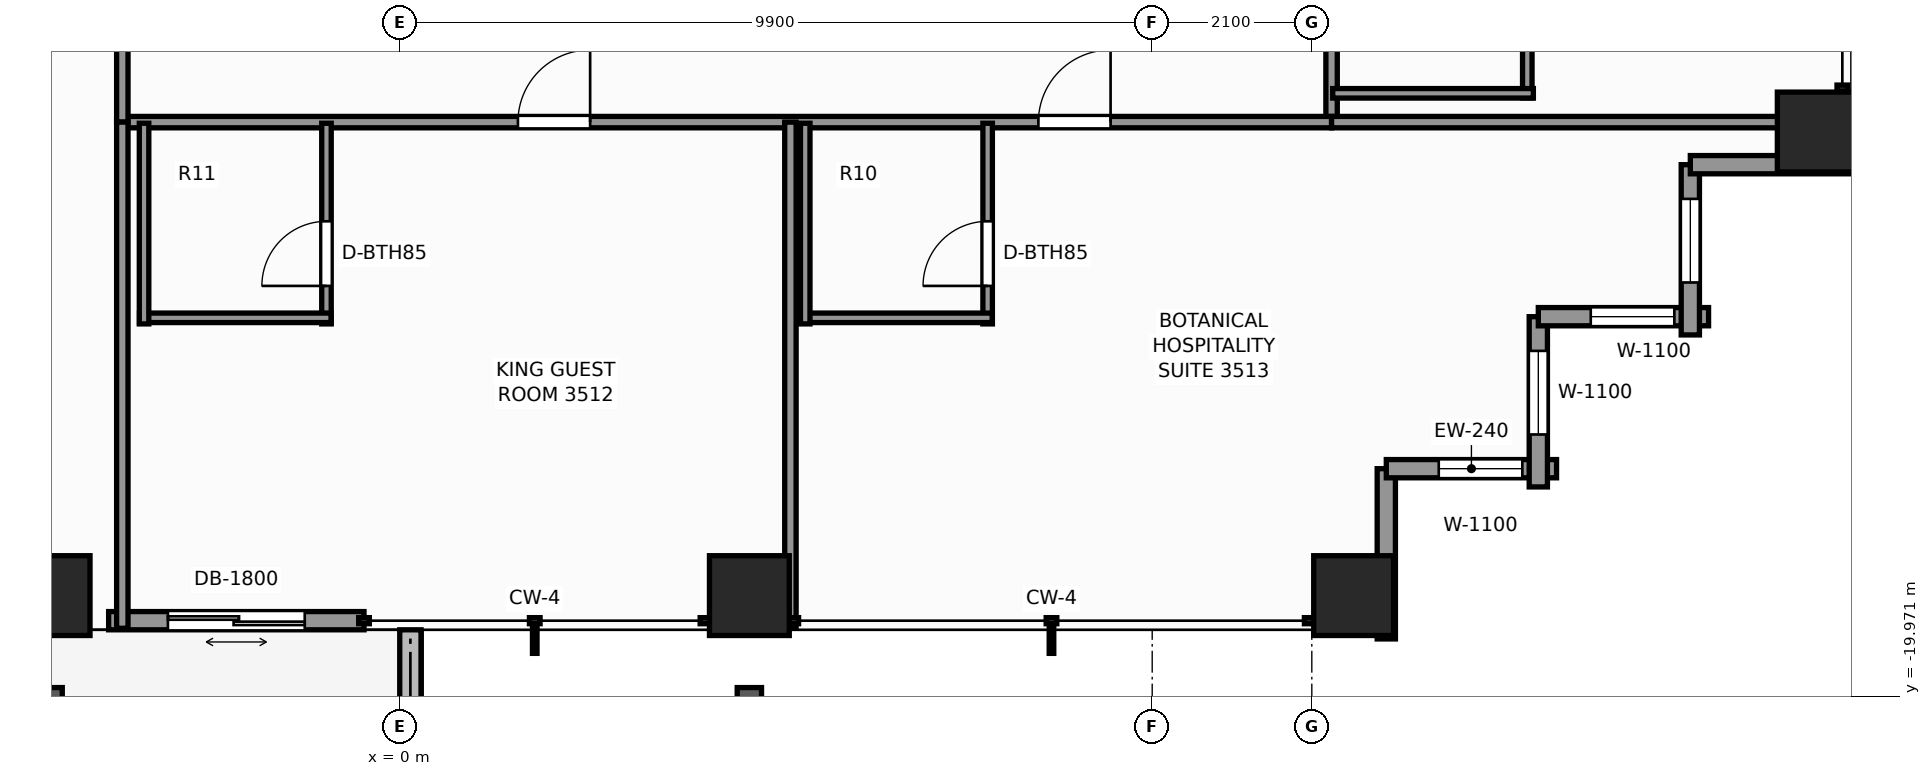
"""IFC4 building model, lengths in metres.
Left out: names, types, materials, properties, quantities, classifications, styles, units other than length and angle.
Written with IfcOpenShell. Run it as: python <this file> out.ifc"""

import sys

from ifc_helpers import new_model, si_unit, direction, frame, frame_2d, origin, origin_2d, place, context, subcontext, project, spatial, rectangle, extrude, element, fill, save


model = new_model("IFC4")
c1 = context("Model", 3, precision=1e-05, world=origin(), true_north=direction((0.0, 1.0)))
c2 = subcontext(c1, "Body", "Model", "MODEL_VIEW")
j1 = project(units=[si_unit("LENGTHUNIT", "METRE"), si_unit("PLANEANGLEUNIT", "RADIAN")], contexts=[c1])
p1 = place(None, origin())
s1 = spatial("IfcSite", under=j1, at=p1, CompositionType="ELEMENT")
p2 = place(p1, origin())
s2 = spatial("IfcBuilding", under=s1, at=p2, CompositionType="ELEMENT")
p3 = place(p2, frame((0.0, 0.0, 121.7)))
s3 = spatial("IfcBuildingStorey", under=s2, at=p3, CompositionType="ELEMENT", Elevation=121.7)
for number, where, z_axis, x_axis in (
    (1, (-4.6, -18.65, 0.0), (0.0, 0.0, 1.0), (1.0, 0.0, 0.0)),
    (2, (4.6, -18.65, 0.0), (0.0, 0.0, 1.0), (1.0, 0.0, 0.0)),
    (3, (12.55, -18.65, 0.0), (0.0, 0.0, 1.0), (1.0, 0.0, 0.0)),
    (4, (18.65, -12.55, 0.0), (0.0, 0.0, 1.0), (1.0, 0.0, 0.0)),
):
    element("IfcColumn", number, at=place(p3, frame(where, z_axis=z_axis, x_axis=x_axis)), inside=s3, PredefinedType="COLUMN", context=c2, shape_type="SweptSolid", body=[
        extrude(rectangle(XDim=1.05, YDim=1.05, at=origin_2d()), origin(), (0.0, 0.0, 1.0), 3.3),
    ])
p4 = place(p3, frame((0.14, -22.4, -0.04), z_axis=(0.0, 0.0, 1.0), x_axis=(0.0, 1.0, 0.0)))
e5 = element("IfcWall", 5, at=p4, inside=s3, PredefinedType="PARAPET", context=c2, shape_type="SweptSolid", body=[
    extrude(rectangle(XDim=3.3, YDim=0.28, at=frame_2d((1.65, 0.0))), origin(), (0.0, 0.0, 1.0), 0.42),
])
p5 = place(p3, frame((-0.47, -18.98, 0.0), z_axis=(0.0, 0.0, 1.0), x_axis=(-1.0, 0.0, 0.0)))
e6 = element("IfcWall", 6, at=p5, inside=s3, PredefinedType="STANDARD", context=c2, shape_type="SweptSolid", body=[
    extrude(rectangle(XDim=3.36, YDim=0.24, at=frame_2d((1.68, 0.0))), origin(), (0.0, 0.0, 1.0), 3.08),
])
p6 = place(p5, frame((0.78, 0.0, 0.0)))
e7 = element("IfcOpeningElement", 7, at=p6, cuts=e6, PredefinedType="OPENING", context=c2, shape_type="SweptSolid", body=[
    extrude(rectangle(XDim=1.8, YDim=2.2, at=frame_2d((0.9, 1.1))), frame((0.0, 0.13, 0.0), z_axis=(0.0, -1.0, 0.0), x_axis=(1.0, 0.0, 0.0)), (0.0, 0.0, 1.0), 0.26),
])
p7 = place(p3, frame((12.98, -16.98, 0.0), z_axis=(0.0, 0.0, 1.0), x_axis=(0.0, -1.0, 0.0)))
e8 = element("IfcWall", 8, at=p7, inside=s3, PredefinedType="STANDARD", context=c2, shape_type="SweptSolid", body=[
    extrude(rectangle(XDim=2.24, YDim=0.24, at=frame_2d((1.12, 0.0))), origin(), (0.0, 0.0, 1.0), 2.459),
])
p8 = place(p3, frame((15.22, -16.98, 0.0), z_axis=(0.0, 0.0, 1.0), x_axis=(-1.0, 0.0, 0.0)))
e9 = element("IfcWall", 9, at=p8, inside=s3, PredefinedType="STANDARD", context=c2, shape_type="SweptSolid", body=[
    extrude(rectangle(XDim=2.24, YDim=0.24, at=frame_2d((1.12, 0.0))), origin(), (0.0, 0.0, 1.0), 2.459),
])
p9 = place(p8, frame((0.45, 0.0, 0.65)))
e10 = element("IfcOpeningElement", 10, at=p9, cuts=e9, PredefinedType="OPENING", context=c2, shape_type="SweptSolid", body=[
    extrude(rectangle(XDim=1.1, YDim=1.45, at=frame_2d((0.55, 0.725))), frame((0.0, 0.13, 0.0), z_axis=(0.0, -1.0, 0.0), x_axis=(1.0, 0.0, 0.0)), (0.0, 0.0, 1.0), 0.26),
])
p10 = place(p3, frame((14.98, -14.98, 0.0), z_axis=(0.0, 0.0, 1.0), x_axis=(0.0, -1.0, 0.0)))
e11 = element("IfcWall", 11, at=p10, inside=s3, PredefinedType="STANDARD", context=c2, shape_type="SweptSolid", body=[
    extrude(rectangle(XDim=2.24, YDim=0.24, at=frame_2d((1.12, 0.0))), origin(), (0.0, 0.0, 1.0), 2.459),
])
p11 = place(p10, frame((0.45, 0.0, 0.65)))
e12 = element("IfcOpeningElement", 12, at=p11, cuts=e11, PredefinedType="OPENING", context=c2, shape_type="SweptSolid", body=[
    extrude(rectangle(XDim=1.1, YDim=1.45, at=frame_2d((0.55, 0.725))), frame((0.0, 0.13, 0.0), z_axis=(0.0, -1.0, 0.0), x_axis=(1.0, 0.0, 0.0)), (0.0, 0.0, 1.0), 0.26),
])
p12 = place(p3, frame((17.22, -14.98, 0.0), z_axis=(0.0, 0.0, 1.0), x_axis=(-1.0, 0.0, 0.0)))
e13 = element("IfcWall", 13, at=p12, inside=s3, PredefinedType="STANDARD", context=c2, shape_type="SweptSolid", body=[
    extrude(rectangle(XDim=2.24, YDim=0.24, at=frame_2d((1.12, 0.0))), origin(), (0.0, 0.0, 1.0), 2.459),
])
p13 = place(p12, frame((0.45, 0.0, 0.65)))
e14 = element("IfcOpeningElement", 14, at=p13, cuts=e13, PredefinedType="OPENING", context=c2, shape_type="SweptSolid", body=[
    extrude(rectangle(XDim=1.1, YDim=1.45, at=frame_2d((0.55, 0.725))), frame((0.0, 0.13, 0.0), z_axis=(0.0, -1.0, 0.0), x_axis=(1.0, 0.0, 0.0)), (0.0, 0.0, 1.0), 0.26),
])
p14 = place(p3, frame((16.98, -12.98, 0.0), z_axis=(0.0, 0.0, 1.0), x_axis=(0.0, -1.0, 0.0)))
e15 = element("IfcWall", 15, at=p14, inside=s3, PredefinedType="STANDARD", context=c2, shape_type="SweptSolid", body=[
    extrude(rectangle(XDim=2.24, YDim=0.24, at=frame_2d((1.12, 0.0))), origin(), (0.0, 0.0, 1.0), 2.459),
])
p15 = place(p14, frame((0.45, 0.0, 0.65)))
e16 = element("IfcOpeningElement", 16, at=p15, cuts=e15, PredefinedType="OPENING", context=c2, shape_type="SweptSolid", body=[
    extrude(rectangle(XDim=1.1, YDim=1.45, at=frame_2d((0.55, 0.725))), frame((0.0, 0.13, 0.0), z_axis=(0.0, -1.0, 0.0), x_axis=(1.0, 0.0, 0.0)), (0.0, 0.0, 1.0), 0.26),
])
p16 = place(p3, frame((19.22, -12.98, 0.0), z_axis=(0.0, 0.0, 1.0), x_axis=(-1.0, 0.0, 0.0)))
e17 = element("IfcWall", 17, at=p16, inside=s3, PredefinedType="STANDARD", context=c2, shape_type="SweptSolid", body=[
    extrude(rectangle(XDim=2.24, YDim=0.24, at=frame_2d((1.12, 0.0))), origin(), (0.0, 0.0, 1.0), 2.459),
])
p17 = place(p3, frame((12.26, -12.42, 0.0), z_axis=(0.0, 0.0, 1.0), x_axis=(0.0, 1.0, 0.0)))
e18 = element("IfcWall", 18, at=p17, inside=s3, PredefinedType="PARTITIONING", context=c2, shape_type="SweptSolid", body=[
    extrude(rectangle(XDim=24.84, YDim=0.15, at=frame_2d((12.42, 0.0))), origin(), (0.0, 0.0, 1.0), 2.292),
])
p18 = place(p17, frame((4.224, 0.0, 0.0)))
e19 = element("IfcOpeningElement", 19, at=p18, cuts=e18, PredefinedType="OPENING", context=c2, shape_type="SweptSolid", body=[
    extrude(rectangle(XDim=0.95, YDim=2.06, at=frame_2d((0.475, 1.03))), frame((0.0, 0.085, 0.0), z_axis=(0.0, -1.0, 0.0), x_axis=(1.0, 0.0, 0.0)), (0.0, 0.0, 1.0), 0.17),
])
p19 = place(p17, frame((10.417, 0.0, 0.0)))
e20 = element("IfcOpeningElement", 20, at=p19, cuts=e18, PredefinedType="OPENING", context=c2, shape_type="SweptSolid", body=[
    extrude(rectangle(XDim=0.95, YDim=2.06, at=frame_2d((0.475, 1.03))), frame((0.0, 0.085, 0.0), z_axis=(0.0, -1.0, 0.0), x_axis=(1.0, 0.0, 0.0)), (0.0, 0.0, 1.0), 0.17),
])
p20 = place(p17, frame((18.556, 0.0, 0.0)))
e21 = element("IfcOpeningElement", 21, at=p20, cuts=e18, PredefinedType="OPENING", context=c2, shape_type="SweptSolid", body=[
    extrude(rectangle(XDim=0.95, YDim=2.06, at=frame_2d((0.475, 1.03))), frame((0.0, 0.085, 0.0), z_axis=(0.0, -1.0, 0.0), x_axis=(1.0, 0.0, 0.0)), (0.0, 0.0, 1.0), 0.17),
])
p21 = place(p17, frame((20.916, 0.0, 0.0)))
e22 = element("IfcOpeningElement", 22, at=p21, cuts=e18, PredefinedType="OPENING", context=c2, shape_type="SweptSolid", body=[
    extrude(rectangle(XDim=0.9, YDim=2.06, at=frame_2d((0.45, 1.03))), frame((0.0, 0.085, 0.0), z_axis=(0.0, -1.0, 0.0), x_axis=(1.0, 0.0, 0.0)), (0.0, 0.0, 1.0), 0.17),
])
p22 = place(p3, frame((-3.65, -12.42, 0.0), z_axis=(0.0, 0.0, 1.0), x_axis=(1.0, 0.0, 0.0)))
e23 = element("IfcWall", 23, at=p22, inside=s3, PredefinedType="PARTITIONING", context=c2, shape_type="SweptSolid", body=[
    extrude(rectangle(XDim=15.91, YDim=0.15, at=frame_2d((7.955, 0.0))), origin(), (0.0, 0.0, 1.0), 2.292),
])
p23 = place(p22, frame((5.205, 0.0, 0.0)))
e24 = element("IfcOpeningElement", 24, at=p23, cuts=e23, PredefinedType="OPENING", context=c2, shape_type="SweptSolid", body=[
    extrude(rectangle(XDim=0.95, YDim=2.06, at=frame_2d((0.475, 1.03))), frame((0.0, 0.085, 0.0), z_axis=(0.0, -1.0, 0.0), x_axis=(1.0, 0.0, 0.0)), (0.0, 0.0, 1.0), 0.17),
])
p24 = place(p22, frame((12.052, 0.0, 0.0)))
e25 = element("IfcOpeningElement", 25, at=p24, cuts=e23, PredefinedType="OPENING", context=c2, shape_type="SweptSolid", body=[
    extrude(rectangle(XDim=0.95, YDim=2.06, at=frame_2d((0.475, 1.03))), frame((0.0, 0.085, 0.0), z_axis=(0.0, -1.0, 0.0), x_axis=(1.0, 0.0, 0.0)), (0.0, 0.0, 1.0), 0.17),
])
p25 = place(p3, frame((-3.65, -12.42, 0.0), z_axis=(0.0, 0.0, 1.0), x_axis=(0.0, 1.0, 0.0)))
e26 = element("IfcWall", 26, at=p25, inside=s3, PredefinedType="PARTITIONING", context=c2, shape_type="SweptSolid", body=[
    extrude(rectangle(XDim=2.52, YDim=0.15, at=frame_2d((1.26, 0.0))), origin(), (0.0, 0.0, 1.0), 3.08),
])
p26 = place(p3, frame((12.26, -12.42, 0.0), z_axis=(0.0, 0.0, 1.0), x_axis=(1.0, 0.0, 0.0)))
e27 = element("IfcWall", 27, at=p26, inside=s3, PredefinedType="PARTITIONING", context=c2, shape_type="SweptSolid", body=[
    extrude(rectangle(XDim=6.82, YDim=0.15, at=frame_2d((3.41, 0.0))), origin(), (0.0, 0.0, 1.0), 2.292),
])
p27 = place(p3, frame((14.835, -12.101, 0.0), z_axis=(0.0, 0.0, 1.0), x_axis=(0.0, 1.0, 0.0)))
e28 = element("IfcWall", 28, at=p27, inside=s3, PredefinedType="PARTITIONING", context=c2, shape_type="SweptSolid", body=[
    extrude(rectangle(XDim=2.52, YDim=0.125, at=frame_2d((1.26, 0.0))), origin(), (0.0, 0.0, 1.0), 2.292),
])
p28 = place(p3, frame((12.275, -12.041, 0.0), z_axis=(0.0, 0.0, 1.0), x_axis=(1.0, 0.0, 0.0)))
e29 = element("IfcWall", 29, at=p28, inside=s3, PredefinedType="PARTITIONING", context=c2, shape_type="SweptSolid", body=[
    extrude(rectangle(XDim=2.64, YDim=0.125, at=frame_2d((1.32, 0.0))), origin(), (0.0, 0.0, 1.0), 3.08),
])
for number, where, z_axis, x_axis in (
    (30, (-3.65, -19.08, 0.0), (0.0, 0.0, 1.0), (0.0, 1.0, 0.0)),
    (31, (5.14, -19.08, 0.0), (0.0, 0.0, 1.0), (0.0, 1.0, 0.0)),
):
    element("IfcWall", number, at=place(p3, frame(where, z_axis=z_axis, x_axis=x_axis)), inside=s3, PredefinedType="PARTITIONING", context=c2, shape_type="SweptSolid", body=[
        extrude(rectangle(XDim=6.66, YDim=0.15, at=frame_2d((3.33, 0.0))), origin(), (0.0, 0.0, 1.0), 2.449),
    ])
p29 = place(p3, frame((-0.964, -15.075, 0.0), z_axis=(0.0, 0.0, 1.0), x_axis=(0.0, 1.0, 0.0)))
e32 = element("IfcWall", 32, at=p29, inside=s3, PredefinedType="PARTITIONING", context=c2, shape_type="SweptSolid", body=[
    extrude(rectangle(XDim=2.64, YDim=0.125, at=frame_2d((1.32, 0.0))), origin(), (0.0, 0.0, 1.0), 3.08),
])
p30 = place(p29, frame((0.5, 0.0, 0.0)))
e33 = element("IfcOpeningElement", 33, at=p30, cuts=e32, PredefinedType="OPENING", context=c2, shape_type="SweptSolid", body=[
    extrude(rectangle(XDim=0.85, YDim=2.03, at=frame_2d((0.425, 1.015))), frame((0.0, 0.073, 0.0), z_axis=(0.0, -1.0, 0.0), x_axis=(1.0, 0.0, 0.0)), (0.0, 0.0, 1.0), 0.145),
])
p31 = place(p3, frame((-3.424, -14.995, 0.0), z_axis=(0.0, 0.0, 1.0), x_axis=(1.0, 0.0, 0.0)))
e34 = element("IfcWall", 34, at=p31, inside=s3, PredefinedType="PARTITIONING", context=c2, shape_type="SweptSolid", body=[
    extrude(rectangle(XDim=2.52, YDim=0.125, at=frame_2d((1.26, 0.0))), origin(), (0.0, 0.0, 1.0), 3.08),
])
p32 = place(p3, frame((-3.364, -15.075, 0.0), z_axis=(0.0, 0.0, 1.0), x_axis=(0.0, 1.0, 0.0)))
e35 = element("IfcWall", 35, at=p32, inside=s3, PredefinedType="PARTITIONING", context=c2, shape_type="SweptSolid", body=[
    extrude(rectangle(XDim=2.64, YDim=0.125, at=frame_2d((1.32, 0.0))), origin(), (0.0, 0.0, 1.0), 3.08),
])
p33 = place(p3, frame((7.735, -15.075, 0.0), z_axis=(0.0, 0.0, 1.0), x_axis=(0.0, 1.0, 0.0)))
e36 = element("IfcWall", 36, at=p33, inside=s3, PredefinedType="PARTITIONING", context=c2, shape_type="SweptSolid", body=[
    extrude(rectangle(XDim=2.64, YDim=0.125, at=frame_2d((1.32, 0.0))), origin(), (0.0, 0.0, 1.0), 3.08),
])
p34 = place(p33, frame((0.5, 0.0, 0.0)))
e37 = element("IfcOpeningElement", 37, at=p34, cuts=e36, PredefinedType="OPENING", context=c2, shape_type="SweptSolid", body=[
    extrude(rectangle(XDim=0.85, YDim=2.03, at=frame_2d((0.425, 1.015))), frame((0.0, 0.073, 0.0), z_axis=(0.0, -1.0, 0.0), x_axis=(1.0, 0.0, 0.0)), (0.0, 0.0, 1.0), 0.145),
])
p35 = place(p3, frame((5.275, -14.995, 0.0), z_axis=(0.0, 0.0, 1.0), x_axis=(1.0, 0.0, 0.0)))
e38 = element("IfcWall", 38, at=p35, inside=s3, PredefinedType="PARTITIONING", context=c2, shape_type="SweptSolid", body=[
    extrude(rectangle(XDim=2.52, YDim=0.125, at=frame_2d((1.26, 0.0))), origin(), (0.0, 0.0, 1.0), 3.08),
])
p36 = place(p3, frame((5.335, -15.075, 0.0), z_axis=(0.0, 0.0, 1.0), x_axis=(0.0, 1.0, 0.0)))
e39 = element("IfcWall", 39, at=p36, inside=s3, PredefinedType="PARTITIONING", context=c2, shape_type="SweptSolid", body=[
    extrude(rectangle(XDim=2.64, YDim=0.125, at=frame_2d((1.32, 0.0))), origin(), (0.0, 0.0, 1.0), 3.08),
])
p37 = place(p6, origin())
e40 = element("IfcDoor", 40, at=p37, inside=s3, OperationType="DOUBLE_DOOR_SLIDING", PredefinedType="DOOR", context=c2, shape_type="SweptSolid", body=[
    extrude(rectangle(XDim=1.8, YDim=2.2, at=frame_2d((0.9, 1.1))), frame((0.0, 0.025, 0.0), z_axis=(0.0, -1.0, 0.0), x_axis=(1.0, 0.0, 0.0)), (0.0, 0.0, 1.0), 0.05),
])
fill(e7, e40)
p38 = place(p9, origin())
e41 = element("IfcWindow", 41, at=p38, inside=s3, PartitioningType="SINGLE_PANEL", PredefinedType="WINDOW", context=c2, shape_type="SweptSolid", body=[
    extrude(rectangle(XDim=1.1, YDim=1.45, at=frame_2d((0.55, 0.725))), frame((0.0, 0.03, 0.0), z_axis=(0.0, -1.0, 0.0), x_axis=(1.0, 0.0, 0.0)), (0.0, 0.0, 1.0), 0.06),
])
fill(e10, e41)
p39 = place(p11, origin())
e42 = element("IfcWindow", 42, at=p39, inside=s3, PartitioningType="SINGLE_PANEL", PredefinedType="WINDOW", context=c2, shape_type="SweptSolid", body=[
    extrude(rectangle(XDim=1.1, YDim=1.45, at=frame_2d((0.55, 0.725))), frame((0.0, 0.03, 0.0), z_axis=(0.0, -1.0, 0.0), x_axis=(1.0, 0.0, 0.0)), (0.0, 0.0, 1.0), 0.06),
])
fill(e12, e42)
p40 = place(p13, origin())
e43 = element("IfcWindow", 43, at=p40, inside=s3, PartitioningType="SINGLE_PANEL", PredefinedType="WINDOW", context=c2, shape_type="SweptSolid", body=[
    extrude(rectangle(XDim=1.1, YDim=1.45, at=frame_2d((0.55, 0.725))), frame((0.0, 0.03, 0.0), z_axis=(0.0, -1.0, 0.0), x_axis=(1.0, 0.0, 0.0)), (0.0, 0.0, 1.0), 0.06),
])
fill(e14, e43)
p41 = place(p15, origin())
e44 = element("IfcWindow", 44, at=p41, inside=s3, PartitioningType="SINGLE_PANEL", PredefinedType="WINDOW", context=c2, shape_type="SweptSolid", body=[
    extrude(rectangle(XDim=1.1, YDim=1.45, at=frame_2d((0.55, 0.725))), frame((0.0, 0.03, 0.0), z_axis=(0.0, -1.0, 0.0), x_axis=(1.0, 0.0, 0.0)), (0.0, 0.0, 1.0), 0.06),
])
fill(e16, e44)
p42 = place(p30, origin())
e45 = element("IfcDoor", 45, at=p42, inside=s3, OperationType="SINGLE_SWING_LEFT", PredefinedType="DOOR", context=c2, shape_type="SweptSolid", body=[
    extrude(rectangle(XDim=0.85, YDim=2.03, at=frame_2d((0.425, 1.015))), frame((0.0, 0.025, 0.0), z_axis=(0.0, -1.0, 0.0), x_axis=(1.0, 0.0, 0.0)), (0.0, 0.0, 1.0), 0.05),
])
fill(e33, e45)
p43 = place(p23, origin())
e46 = element("IfcDoor", 46, at=p43, inside=s3, OperationType="SINGLE_SWING_RIGHT", PredefinedType="DOOR", context=c2, shape_type="SweptSolid", body=[
    extrude(rectangle(XDim=0.95, YDim=2.06, at=frame_2d((0.475, 1.03))), frame((0.0, 0.025, 0.0), z_axis=(0.0, -1.0, 0.0), x_axis=(1.0, 0.0, 0.0)), (0.0, 0.0, 1.0), 0.05),
])
fill(e24, e46)
p44 = place(p34, origin())
e47 = element("IfcDoor", 47, at=p44, inside=s3, OperationType="SINGLE_SWING_LEFT", PredefinedType="DOOR", context=c2, shape_type="SweptSolid", body=[
    extrude(rectangle(XDim=0.85, YDim=2.03, at=frame_2d((0.425, 1.015))), frame((0.0, 0.025, 0.0), z_axis=(0.0, -1.0, 0.0), x_axis=(1.0, 0.0, 0.0)), (0.0, 0.0, 1.0), 0.05),
])
fill(e37, e47)
p45 = place(p24, origin())
e48 = element("IfcDoor", 48, at=p45, inside=s3, OperationType="SINGLE_SWING_RIGHT", PredefinedType="DOOR", context=c2, shape_type="SweptSolid", body=[
    extrude(rectangle(XDim=0.95, YDim=2.06, at=frame_2d((0.475, 1.03))), frame((0.0, 0.025, 0.0), z_axis=(0.0, -1.0, 0.0), x_axis=(1.0, 0.0, 0.0)), (0.0, 0.0, 1.0), 0.05),
])
fill(e25, e48)
save(model, sys.argv[1])
